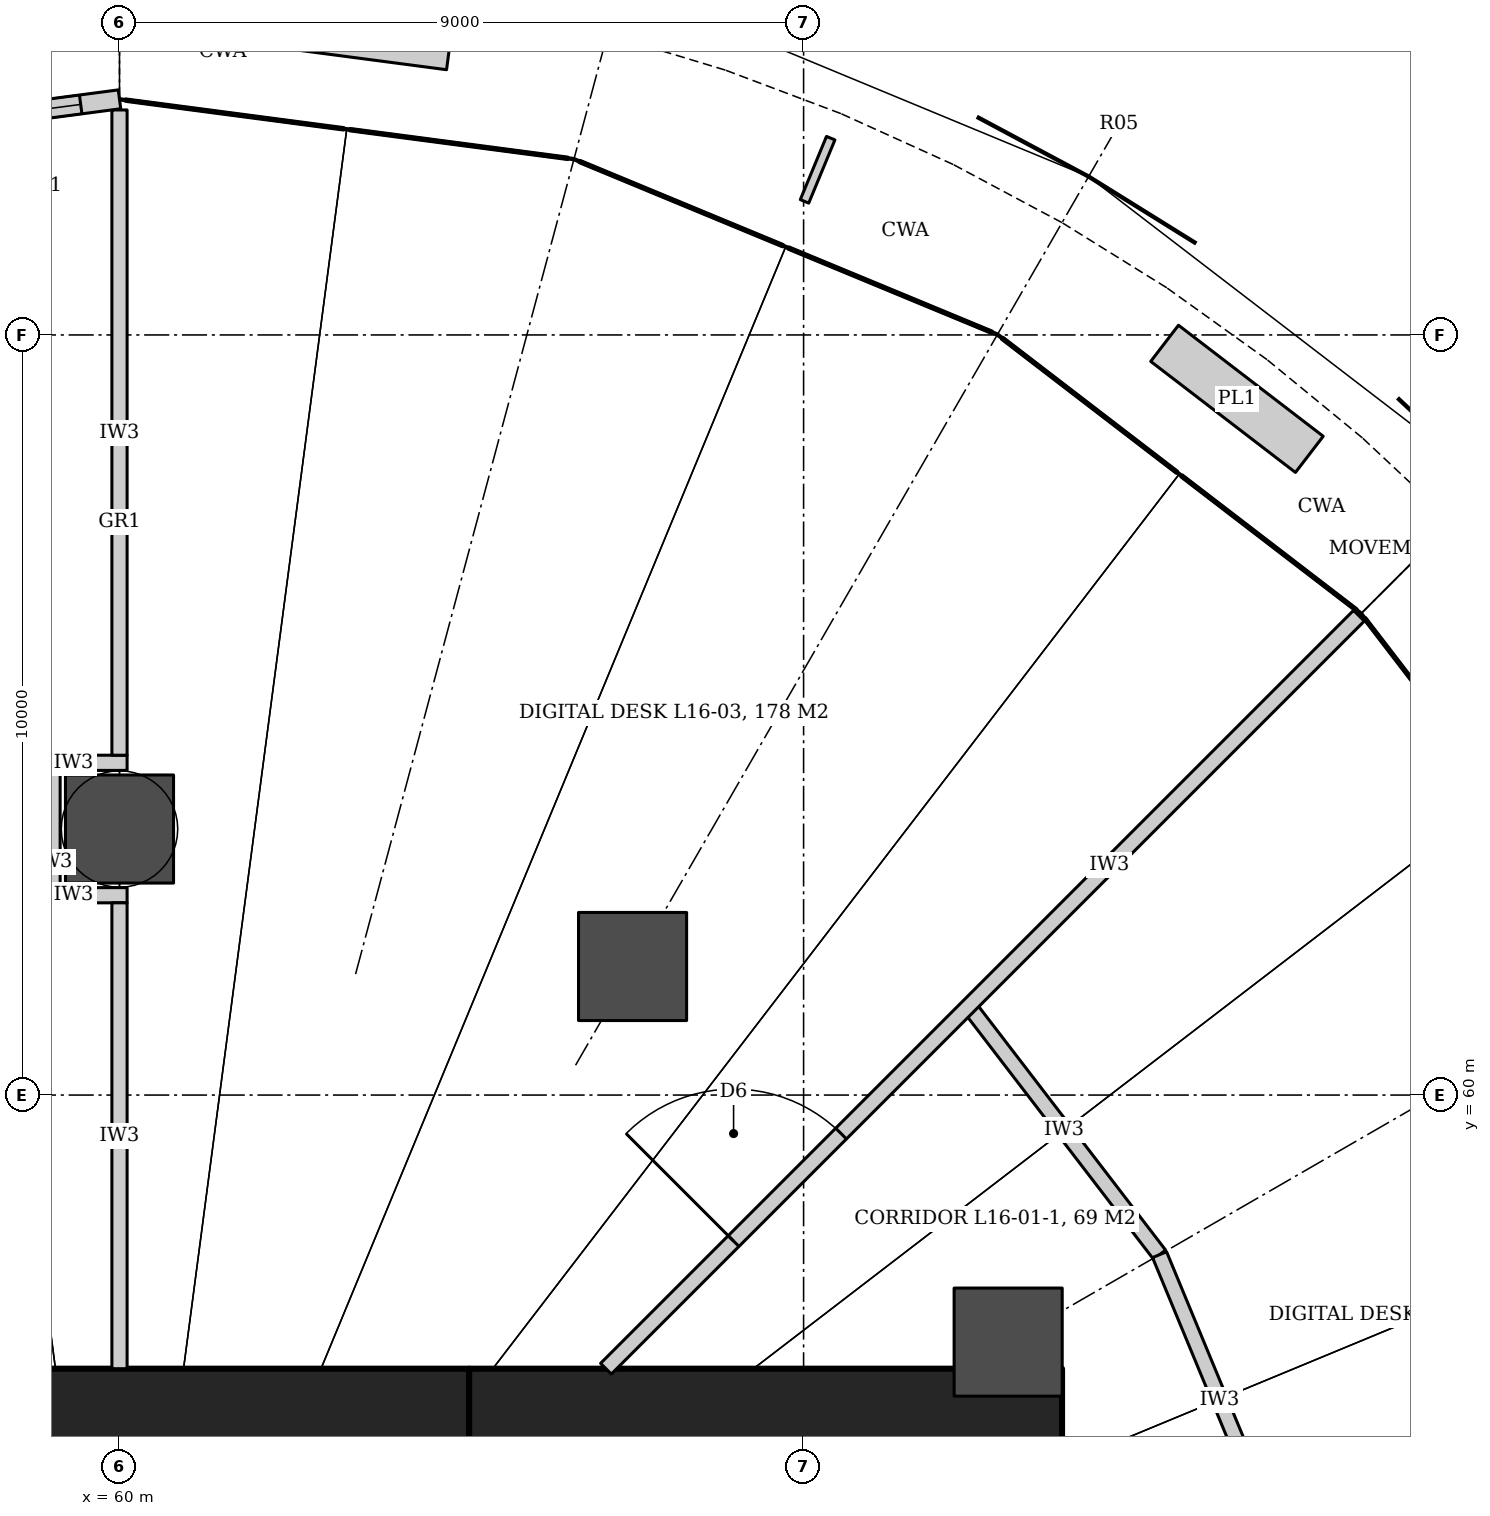
"""IFC4 building model, lengths in metres.
Left out: names, types, materials, properties, quantities, classifications, styles, units other than length and angle.
Written with IfcOpenShell. Run it as: python <this file> out.ifc"""

import sys

from ifc_helpers import new_model, si_unit, direction, frame, frame_2d, origin, origin_2d, place, context, subcontext, project, spatial, rectangle, hollow_circle, extrude, element, fill, save


model = new_model("IFC4")
c1 = context("Model", 3, precision=1e-05, world=origin(), true_north=direction((0.0, 1.0)))
c2 = subcontext(c1, "Body", "Model", "MODEL_VIEW")
j1 = project(units=[si_unit("LENGTHUNIT", "METRE"), si_unit("PLANEANGLEUNIT", "RADIAN")], contexts=[c1])
p1 = place(None, origin())
s1 = spatial("IfcSite", under=j1, at=p1, CompositionType="ELEMENT")
p2 = place(p1, origin())
s2 = spatial("IfcBuilding", under=s1, at=p2, CompositionType="ELEMENT")
p3 = place(p2, frame((0.0, 0.0, 68.0)))
s3 = spatial("IfcBuildingStorey", under=s2, at=p3, CompositionType="ELEMENT", Elevation=68.0)
p4 = place(p3, frame((55.4, 55.5, 0.0), z_axis=(0.0, 0.0, 1.0), x_axis=(1.0, 0.0, 0.0)))
e1 = element("IfcWall", 1, at=p4, inside=s3, PredefinedType="SHEAR", context=c2, shape_type="SweptSolid", body=[
    extrude(rectangle(XDim=9.2, YDim=1.8, at=frame_2d((4.6, 0.0))), origin(), (0.0, 0.0, 1.0), 4.2),
])
p5 = place(p3, frame((64.6, 55.5, 0.0), z_axis=(0.0, 0.0, 1.0), x_axis=(1.0, 0.0, 0.0)))
e2 = element("IfcWall", 2, at=p5, inside=s3, PredefinedType="SHEAR", context=c2, shape_type="SweptSolid", body=[
    extrude(rectangle(XDim=7.8, YDim=1.8, at=frame_2d((3.9, 0.0))), origin(), (0.0, 0.0, 1.0), 4.2),
])
for number, where, z_axis, x_axis in (
    (3, (71.691, 56.75, 0.0), (0.0, 0.0, 1.0), (1.0, 0.0, 0.0)),
    (4, (66.75, 61.691, 0.0), (0.0, 0.0, 1.0), (1.0, 0.0, 0.0)),
    (5, (60.0, 63.5, 0.0), (0.0, 0.0, 1.0), (1.0, 0.0, 0.0)),
):
    element("IfcColumn", number, at=place(p3, frame(where, z_axis=z_axis, x_axis=x_axis)), inside=s3, PredefinedType="COLUMN", context=c2, shape_type="SweptSolid", body=[
        extrude(hollow_circle(Radius=0.711, WallThickness=0.07, at=origin_2d()), origin(), (0.0, 0.0, 1.0), 4.2),
    ])
p6 = place(p3, frame((71.172, 61.172, 0.0), z_axis=(0.0, 0.0, 1.0), x_axis=(0.608714823874, -0.793389099494, 0.0)))
e6 = element("IfcWall", 6, at=p6, inside=s3, PredefinedType="PARTITIONING", context=c2, shape_type="SweptSolid", body=[
    extrude(rectangle(XDim=4.125, YDim=0.2, at=frame_2d((2.062, 0.0))), origin(), (0.0, 0.0, 1.0), 3.04),
])
p7 = place(p3, frame((73.683, 57.9, 0.0), z_axis=(0.0, 0.0, 1.0), x_axis=(0.382731667114, -0.923859551549, 0.0)))
e7 = element("IfcWall", 7, at=p7, inside=s3, PredefinedType="PARTITIONING", context=c2, shape_type="SweptSolid", body=[
    extrude(rectangle(XDim=4.125, YDim=0.2, at=frame_2d((2.062, 0.0))), origin(), (0.0, 0.0, 1.0), 3.04),
])
p8 = place(p3, frame((66.4, 56.4, 0.0), z_axis=(0.0, 0.0, 1.0), x_axis=(0.707106781187, 0.707106781187, 0.0)))
e8 = element("IfcWall", 8, at=p8, inside=s3, PredefinedType="PARTITIONING", context=c2, shape_type="SweptSolid", body=[
    extrude(rectangle(XDim=13.909, YDim=0.2, at=frame_2d((6.955, 0.0))), origin(), (0.0, 0.0, 1.0), 3.02),
])
p9 = place(p8, frame((2.375, 0.0, 0.0)))
e9 = element("IfcOpeningElement", 9, at=p9, cuts=e8, PredefinedType="OPENING", context=c2, shape_type="SweptSolid", body=[
    extrude(rectangle(XDim=2.0, YDim=2.1, at=frame_2d((1.0, 1.05))), frame((0.0, 0.11, 0.0), z_axis=(0.0, -1.0, 0.0), x_axis=(1.0, 0.0, 0.0)), (0.0, 0.0, 1.0), 0.22),
])
for number, where, z_axis, x_axis in (
    (10, (60.1, 62.629, 0.0), (0.0, 0.0, 1.0), (-1.0, 0.0, 0.0)),
    (11, (60.1, 64.371, 0.0), (0.0, 0.0, 1.0), (-1.0, 0.0, 0.0)),
):
    element("IfcWall", number, at=place(p3, frame(where, z_axis=z_axis, x_axis=x_axis)), inside=s3, PredefinedType="PARTITIONING", context=c2, shape_type="SweptSolid", body=[
        extrude(rectangle(XDim=1.081, YDim=0.2, at=frame_2d((0.541, 0.0))), origin(), (0.0, 0.0, 1.0), 3.02),
    ])
p10 = place(p3, frame((59.119, 62.729, 0.0), z_axis=(0.0, 0.0, 1.0), x_axis=(0.0, 1.0, 0.0)))
e12 = element("IfcWall", 12, at=p10, inside=s3, PredefinedType="PARTITIONING", context=c2, shape_type="SweptSolid", body=[
    extrude(rectangle(XDim=1.542, YDim=0.2, at=frame_2d((0.771, 0.0))), origin(), (0.0, 0.0, 1.0), 3.02),
])
p11 = place(p3, frame((60.0, 56.4, 0.0), z_axis=(0.0, 0.0, 1.0), x_axis=(0.0, 1.0, 0.0)))
e13 = element("IfcWall", 13, at=p11, inside=s3, PredefinedType="PARTITIONING", context=c2, shape_type="SweptSolid", body=[
    extrude(rectangle(XDim=6.129, YDim=0.2, at=frame_2d((3.064, 0.0))), origin(), (0.0, 0.0, 1.0), 3.04),
])
p12 = place(p3, frame((60.0, 64.471, 0.0), z_axis=(0.0, 0.0, 1.0), x_axis=(0.0, 1.0, 0.0)))
e14 = element("IfcWall", 14, at=p12, inside=s3, PredefinedType="PARTITIONING", context=c2, shape_type="SweptSolid", body=[
    extrude(rectangle(XDim=8.389, YDim=0.2, at=frame_2d((4.195, 0.0))), origin(), (0.0, 0.0, 1.0), 3.04),
])
p13 = place(p3, frame((60.0, 73.0, 0.0), z_axis=(0.0, 0.0, 1.0), x_axis=(-0.991445297315, -0.130522880875, 0.0)))
e15 = element("IfcWall", 15, at=p13, inside=s3, PredefinedType="SOLIDWALL", context=c2, shape_type="SweptSolid", body=[
    extrude(rectangle(XDim=6.004, YDim=0.25, at=frame_2d((3.002, 0.0))), origin(), (0.0, 0.0, 1.0), 4.04),
])
p14 = place(p13, frame((2.102, 0.0, 0.0)))
e16 = element("IfcOpeningElement", 16, at=p14, cuts=e15, PredefinedType="OPENING", context=c2, shape_type="SweptSolid", body=[
    extrude(rectangle(XDim=1.8, YDim=2.4, at=frame_2d((0.9, 1.2))), frame((0.0, 0.135, 0.0), z_axis=(0.0, -1.0, 0.0), x_axis=(1.0, 0.0, 0.0)), (0.0, 0.0, 1.0), 0.27),
])
p15 = place(p13, frame((0.502, 0.0, 0.0)))
e17 = element("IfcOpeningElement", 17, at=p15, cuts=e15, PredefinedType="OPENING", context=c2, shape_type="SweptSolid", body=[
    extrude(rectangle(XDim=1.2, YDim=2.4, at=frame_2d((0.6, 1.2))), frame((0.0, 0.135, 0.0), z_axis=(0.0, -1.0, 0.0), x_axis=(1.0, 0.0, 0.0)), (0.0, 0.0, 1.0), 0.27),
])
p16 = place(p13, frame((4.302, 0.0, 0.0)))
e18 = element("IfcOpeningElement", 18, at=p16, cuts=e15, PredefinedType="OPENING", context=c2, shape_type="SweptSolid", body=[
    extrude(rectangle(XDim=1.2, YDim=2.4, at=frame_2d((0.6, 1.2))), frame((0.0, 0.135, 0.0), z_axis=(0.0, -1.0, 0.0), x_axis=(1.0, 0.0, 0.0)), (0.0, 0.0, 1.0), 0.27),
])
p17 = place(p9, origin())
e19 = element("IfcDoor", 19, at=p17, inside=s3, OperationType="DOUBLE_DOOR_DOUBLE_SWING", PredefinedType="DOOR", context=c2, shape_type="SweptSolid", body=[
    extrude(rectangle(XDim=2.0, YDim=2.1, at=frame_2d((1.0, 1.05))), frame((0.0, 0.025, 0.0), z_axis=(0.0, -1.0, 0.0), x_axis=(1.0, 0.0, 0.0)), (0.0, 0.0, 1.0), 0.05),
])
fill(e9, e19)
p18 = place(p15, origin())
e20 = element("IfcWindow", 20, at=p18, inside=s3, PartitioningType="SINGLE_PANEL", PredefinedType="WINDOW", context=c2, shape_type="SweptSolid", body=[
    extrude(rectangle(XDim=1.2, YDim=2.4, at=frame_2d((0.6, 1.2))), frame((0.0, 0.03, 0.0), z_axis=(0.0, -1.0, 0.0), x_axis=(1.0, 0.0, 0.0)), (0.0, 0.0, 1.0), 0.06),
])
fill(e17, e20)
save(model, sys.argv[1])
